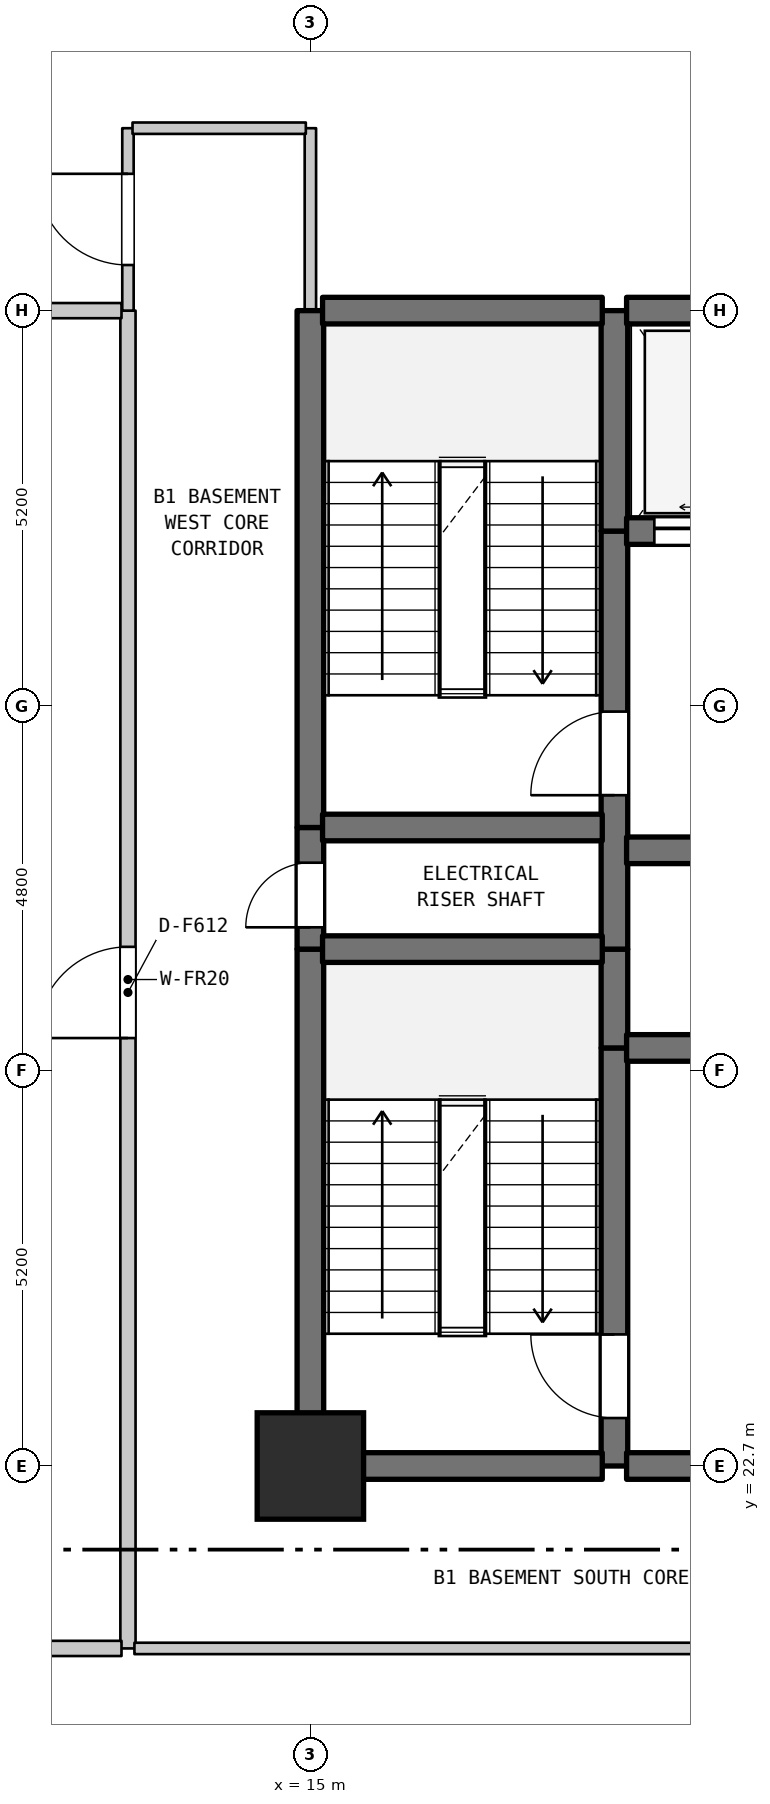
"""IFC4 building model, lengths in metres.
Left out: names, types, materials, properties, quantities, classifications, styles, units other than length and angle.
Written with IfcOpenShell. Run it as: python <this file> out.ifc"""

import sys

from ifc_helpers import new_model, si_unit, direction, frame, frame_2d, origin, origin_2d, place, context, subcontext, project, spatial, rectangle, extrude, element, fill, save


model = new_model("IFC4")
c1 = context("Model", 3, precision=1e-05, world=origin(), true_north=direction((0.0, 1.0)))
c2 = subcontext(c1, "Body", "Model", "MODEL_VIEW")
j1 = project(units=[si_unit("LENGTHUNIT", "METRE"), si_unit("PLANEANGLEUNIT", "RADIAN")], contexts=[c1])
p1 = place(None, origin())
s1 = spatial("IfcSite", under=j1, at=p1, CompositionType="ELEMENT")
p2 = place(p1, origin())
s2 = spatial("IfcBuilding", under=s1, at=p2, CompositionType="ELEMENT")
p3 = place(p2, frame((0.0, 0.0, -4.5)))
s3 = spatial("IfcBuildingStorey", under=s2, at=p3, CompositionType="ELEMENT", Elevation=-4.5)
p4 = place(p3, frame((15.0, 22.7, 0.0), z_axis=(0.0, 0.0, 1.0), x_axis=(1.0, 0.0, 0.0)))
e1 = element("IfcColumn", 1, at=p4, inside=s3, PredefinedType="COLUMN", context=c2, shape_type="SweptSolid", body=[
    extrude(rectangle(XDim=1.4, YDim=1.4, at=origin_2d()), origin(), (0.0, 0.0, 1.0), 4.5),
])
p5 = place(p3, frame((12.6, 20.3, 0.0), z_axis=(0.0, 0.0, 1.0), x_axis=(0.0, 1.0, 0.0)))
e2 = element("IfcWall", 2, at=p5, inside=s3, PredefinedType="STANDARD", context=c2, shape_type="SweptSolid", body=[
    extrude(rectangle(XDim=17.6, YDim=0.2, at=frame_2d((8.8, 0.0))), origin(), (0.0, 0.0, 1.0), 4.1),
])
p6 = place(p5, frame((8.03, 0.0, 0.0)))
e3 = element("IfcOpeningElement", 3, at=p6, cuts=e2, PredefinedType="OPENING", context=c2, shape_type="SweptSolid", body=[
    extrude(rectangle(XDim=1.2, YDim=2.2, at=frame_2d((0.6, 1.1))), frame((0.0, 0.11, 0.0), z_axis=(0.0, -1.0, 0.0), x_axis=(1.0, 0.0, 0.0)), (0.0, 0.0, 1.0), 0.22),
])
p7 = place(p3, frame((12.6, 37.9, 0.0), z_axis=(0.0, 0.0, 1.0), x_axis=(0.0, 1.0, 0.0)))
e4 = element("IfcWall", 4, at=p7, inside=s3, PredefinedType="STANDARD", context=c2, shape_type="SweptSolid", body=[
    extrude(rectangle(XDim=2.4, YDim=0.15, at=frame_2d((1.2, 0.0))), origin(), (0.0, 0.0, 1.0), 4.1),
])
p8 = place(p7, frame((0.6, 0.0, 0.0)))
e5 = element("IfcOpeningElement", 5, at=p8, cuts=e4, PredefinedType="OPENING", context=c2, shape_type="SweptSolid", body=[
    extrude(rectangle(XDim=1.2, YDim=2.2, at=frame_2d((0.6, 1.1))), frame((0.0, 0.085, 0.0), z_axis=(0.0, -1.0, 0.0), x_axis=(1.0, 0.0, 0.0)), (0.0, 0.0, 1.0), 0.17),
])
p9 = place(p3, frame((15.0, 22.7, 0.0), z_axis=(0.0, 0.0, 1.0), x_axis=(0.0, 1.0, 0.0)))
e6 = element("IfcWall", 6, at=p9, inside=s3, PredefinedType="SHEAR", context=c2, shape_type="SweptSolid", body=[
    extrude(rectangle(XDim=6.8, YDim=0.35, at=frame_2d((3.4, 0.0))), origin(), (0.0, 0.0, 1.0), 4.1),
])
p10 = place(p3, frame((15.0, 29.5, 0.0), z_axis=(0.0, 0.0, 1.0), x_axis=(0.0, 1.0, 0.0)))
e7 = element("IfcWall", 7, at=p10, inside=s3, PredefinedType="SHEAR", context=c2, shape_type="SweptSolid", body=[
    extrude(rectangle(XDim=1.6, YDim=0.35, at=frame_2d((0.8, 0.0))), origin(), (0.0, 0.0, 1.0), 4.1),
])
p11 = place(p10, frame((0.287, 0.0, 0.0)))
e8 = element("IfcOpeningElement", 8, at=p11, cuts=e7, PredefinedType="OPENING", context=c2, shape_type="SweptSolid", body=[
    extrude(rectangle(XDim=0.85, YDim=2.1, at=frame_2d((0.425, 1.05))), frame((0.0, 0.185, 0.0), z_axis=(0.0, -1.0, 0.0), x_axis=(1.0, 0.0, 0.0)), (0.0, 0.0, 1.0), 0.37),
])
p12 = place(p3, frame((15.0, 31.1, 0.0), z_axis=(0.0, 0.0, 1.0), x_axis=(0.0, 1.0, 0.0)))
e9 = element("IfcWall", 9, at=p12, inside=s3, PredefinedType="SHEAR", context=c2, shape_type="SweptSolid", body=[
    extrude(rectangle(XDim=6.8, YDim=0.35, at=frame_2d((3.4, 0.0))), origin(), (0.0, 0.0, 1.0), 4.1),
])
p13 = place(p3, frame((15.0, 37.9, 0.0), z_axis=(0.0, 0.0, 1.0), x_axis=(0.0, 1.0, 0.0)))
e10 = element("IfcWall", 10, at=p13, inside=s3, PredefinedType="STANDARD", context=c2, shape_type="SweptSolid", body=[
    extrude(rectangle(XDim=2.4, YDim=0.15, at=frame_2d((1.2, 0.0))), origin(), (0.0, 0.0, 1.0), 4.1),
])
p14 = place(p3, frame((19.0, 22.7, 0.0), z_axis=(0.0, 0.0, 1.0), x_axis=(0.0, 1.0, 0.0)))
e11 = element("IfcWall", 11, at=p14, inside=s3, PredefinedType="SHEAR", context=c2, shape_type="SweptSolid", body=[
    extrude(rectangle(XDim=5.5, YDim=0.35, at=frame_2d((2.75, 0.0))), origin(), (0.0, 0.0, 1.0), 4.1),
])
p15 = place(p14, frame((0.631, 0.0, 0.0)))
e12 = element("IfcOpeningElement", 12, at=p15, cuts=e11, PredefinedType="OPENING", context=c2, shape_type="SweptSolid", body=[
    extrude(rectangle(XDim=1.1, YDim=2.15, at=frame_2d((0.55, 1.075))), frame((0.0, 0.185, 0.0), z_axis=(0.0, -1.0, 0.0), x_axis=(1.0, 0.0, 0.0)), (0.0, 0.0, 1.0), 0.37),
])
p16 = place(p3, frame((19.0, 28.2, 0.0), z_axis=(0.0, 0.0, 1.0), x_axis=(0.0, 1.0, 0.0)))
e13 = element("IfcWall", 13, at=p16, inside=s3, PredefinedType="SHEAR", context=c2, shape_type="SweptSolid", body=[
    extrude(rectangle(XDim=1.3, YDim=0.35, at=frame_2d((0.65, 0.0))), origin(), (0.0, 0.0, 1.0), 4.1),
])
p17 = place(p3, frame((19.0, 29.5, 0.0), z_axis=(0.0, 0.0, 1.0), x_axis=(0.0, 1.0, 0.0)))
e14 = element("IfcWall", 14, at=p17, inside=s3, PredefinedType="SHEAR", context=c2, shape_type="SweptSolid", body=[
    extrude(rectangle(XDim=5.5, YDim=0.35, at=frame_2d((2.75, 0.0))), origin(), (0.0, 0.0, 1.0), 4.1),
])
p18 = place(p17, frame((2.025, 0.0, 0.0)))
e15 = element("IfcOpeningElement", 15, at=p18, cuts=e14, PredefinedType="OPENING", context=c2, shape_type="SweptSolid", body=[
    extrude(rectangle(XDim=1.1, YDim=2.15, at=frame_2d((0.55, 1.075))), frame((0.0, 0.185, 0.0), z_axis=(0.0, -1.0, 0.0), x_axis=(1.0, 0.0, 0.0)), (0.0, 0.0, 1.0), 0.37),
])
p19 = place(p3, frame((19.0, 35.0, 0.0), z_axis=(0.0, 0.0, 1.0), x_axis=(0.0, 1.0, 0.0)))
e16 = element("IfcWall", 16, at=p19, inside=s3, PredefinedType="SHEAR", context=c2, shape_type="SweptSolid", body=[
    extrude(rectangle(XDim=2.9, YDim=0.35, at=frame_2d((1.45, 0.0))), origin(), (0.0, 0.0, 1.0), 4.1),
])
p20 = place(p3, frame((2.01, 20.3, 0.0), z_axis=(0.0, 0.0, 1.0), x_axis=(1.0, 0.0, 0.0)))
e17 = element("IfcWall", 17, at=p20, inside=s3, PredefinedType="STANDARD", context=c2, shape_type="SweptSolid", body=[
    extrude(rectangle(XDim=10.505, YDim=0.2, at=frame_2d((5.252, 0.0))), origin(), (0.0, 0.0, 1.0), 4.1),
])
p21 = place(p3, frame((12.685, 20.3, 0.0), z_axis=(0.0, 0.0, 1.0), x_axis=(1.0, 0.0, 0.0)))
e18 = element("IfcWall", 18, at=p21, inside=s3, PredefinedType="STANDARD", context=c2, shape_type="SweptSolid", body=[
    extrude(rectangle(XDim=20.255, YDim=0.15, at=frame_2d((10.127, 0.0))), origin(), (0.0, 0.0, 1.0), 4.1),
])
p22 = place(p21, frame((8.644, 0.0, 0.0)))
e19 = element("IfcOpeningElement", 19, at=p22, cuts=e18, PredefinedType="OPENING", context=c2, shape_type="SweptSolid", body=[
    extrude(rectangle(XDim=1.2, YDim=2.2, at=frame_2d((0.6, 1.1))), frame((0.0, 0.085, 0.0), z_axis=(0.0, -1.0, 0.0), x_axis=(1.0, 0.0, 0.0)), (0.0, 0.0, 1.0), 0.17),
])
p23 = place(p3, frame((15.16, 22.7, 0.0), z_axis=(0.0, 0.0, 1.0), x_axis=(1.0, 0.0, 0.0)))
e20 = element("IfcWall", 20, at=p23, inside=s3, PredefinedType="SHEAR", context=c2, shape_type="SweptSolid", body=[
    extrude(rectangle(XDim=3.68, YDim=0.35, at=frame_2d((1.84, 0.0))), origin(), (0.0, 0.0, 1.0), 4.1),
])
p24 = place(p3, frame((19.16, 22.7, 0.0), z_axis=(0.0, 0.0, 1.0), x_axis=(1.0, 0.0, 0.0)))
e21 = element("IfcWall", 21, at=p24, inside=s3, PredefinedType="SHEAR", context=c2, shape_type="SweptSolid", body=[
    extrude(rectangle(XDim=4.48, YDim=0.35, at=frame_2d((2.24, 0.0))), origin(), (0.0, 0.0, 1.0), 4.1),
])
p25 = place(p24, frame((1.64, 0.0, 0.0)))
e22 = element("IfcOpeningElement", 22, at=p25, cuts=e21, PredefinedType="OPENING", context=c2, shape_type="SweptSolid", body=[
    extrude(rectangle(XDim=1.2, YDim=2.2, at=frame_2d((0.6, 1.1))), frame((0.0, 0.185, 0.0), z_axis=(0.0, -1.0, 0.0), x_axis=(1.0, 0.0, 0.0)), (0.0, 0.0, 1.0), 0.37),
])
p26 = place(p3, frame((19.16, 28.2, 0.0), z_axis=(0.0, 0.0, 1.0), x_axis=(1.0, 0.0, 0.0)))
e23 = element("IfcWall", 23, at=p26, inside=s3, PredefinedType="SHEAR", context=c2, shape_type="SweptSolid", body=[
    extrude(rectangle(XDim=4.48, YDim=0.35, at=frame_2d((2.24, 0.0))), origin(), (0.0, 0.0, 1.0), 4.1),
])
p27 = place(p26, frame((1.79, 0.0, 0.0)))
e24 = element("IfcOpeningElement", 24, at=p27, cuts=e23, PredefinedType="OPENING", context=c2, shape_type="SweptSolid", body=[
    extrude(rectangle(XDim=0.9, YDim=2.15, at=frame_2d((0.45, 1.075))), frame((0.0, 0.185, 0.0), z_axis=(0.0, -1.0, 0.0), x_axis=(1.0, 0.0, 0.0)), (0.0, 0.0, 1.0), 0.37),
])
p28 = place(p3, frame((15.16, 29.5, 0.0), z_axis=(0.0, 0.0, 1.0), x_axis=(1.0, 0.0, 0.0)))
e25 = element("IfcWall", 25, at=p28, inside=s3, PredefinedType="SHEAR", context=c2, shape_type="SweptSolid", body=[
    extrude(rectangle(XDim=3.68, YDim=0.35, at=frame_2d((1.84, 0.0))), origin(), (0.0, 0.0, 1.0), 4.1),
])
p29 = place(p3, frame((19.16, 30.8, 0.0), z_axis=(0.0, 0.0, 1.0), x_axis=(1.0, 0.0, 0.0)))
e26 = element("IfcWall", 26, at=p29, inside=s3, PredefinedType="SHEAR", context=c2, shape_type="SweptSolid", body=[
    extrude(rectangle(XDim=4.48, YDim=0.35, at=frame_2d((2.24, 0.0))), origin(), (0.0, 0.0, 1.0), 4.1),
])
p30 = place(p3, frame((15.16, 31.1, 0.0), z_axis=(0.0, 0.0, 1.0), x_axis=(1.0, 0.0, 0.0)))
e27 = element("IfcWall", 27, at=p30, inside=s3, PredefinedType="SHEAR", context=c2, shape_type="SweptSolid", body=[
    extrude(rectangle(XDim=3.68, YDim=0.35, at=frame_2d((1.84, 0.0))), origin(), (0.0, 0.0, 1.0), 4.1),
])
p31 = place(p3, frame((19.16, 35.0, 0.0), z_axis=(0.0, 0.0, 1.0), x_axis=(1.0, 0.0, 0.0)))
e28 = element("IfcWall", 28, at=p31, inside=s3, PredefinedType="SHEAR", context=c2, shape_type="SweptSolid", body=[
    extrude(rectangle(XDim=4.48, YDim=0.35, at=frame_2d((2.24, 0.0))), origin(), (0.0, 0.0, 1.0), 4.1),
])
p32 = place(p31, frame((0.365, 0.0, 0.0)))
e29 = element("IfcOpeningElement", 29, at=p32, cuts=e28, PredefinedType="OPENING", context=c2, shape_type="SweptSolid", body=[
    extrude(rectangle(XDim=1.35, YDim=2.2, at=frame_2d((0.675, 1.1))), frame((0.0, 0.185, 0.0), z_axis=(0.0, -1.0, 0.0), x_axis=(1.0, 0.0, 0.0)), (0.0, 0.0, 1.0), 0.37),
])
p33 = place(p31, frame((2.765, 0.0, 0.0)))
e30 = element("IfcOpeningElement", 30, at=p33, cuts=e28, PredefinedType="OPENING", context=c2, shape_type="SweptSolid", body=[
    extrude(rectangle(XDim=1.35, YDim=2.2, at=frame_2d((0.675, 1.1))), frame((0.0, 0.185, 0.0), z_axis=(0.0, -1.0, 0.0), x_axis=(1.0, 0.0, 0.0)), (0.0, 0.0, 1.0), 0.37),
])
p34 = place(p3, frame((15.16, 37.9, 0.0), z_axis=(0.0, 0.0, 1.0), x_axis=(1.0, 0.0, 0.0)))
e31 = element("IfcWall", 31, at=p34, inside=s3, PredefinedType="SHEAR", context=c2, shape_type="SweptSolid", body=[
    extrude(rectangle(XDim=3.68, YDim=0.35, at=frame_2d((1.84, 0.0))), origin(), (0.0, 0.0, 1.0), 4.1),
])
p35 = place(p3, frame((19.16, 37.9, 0.0), z_axis=(0.0, 0.0, 1.0), x_axis=(1.0, 0.0, 0.0)))
e32 = element("IfcWall", 32, at=p35, inside=s3, PredefinedType="SHEAR", context=c2, shape_type="SweptSolid", body=[
    extrude(rectangle(XDim=4.48, YDim=0.35, at=frame_2d((2.24, 0.0))), origin(), (0.0, 0.0, 1.0), 4.1),
])
p36 = place(p3, frame((12.66, 40.3, 0.0), z_axis=(0.0, 0.0, 1.0), x_axis=(1.0, 0.0, 0.0)))
e33 = element("IfcWall", 33, at=p36, inside=s3, PredefinedType="STANDARD", context=c2, shape_type="SweptSolid", body=[
    extrude(rectangle(XDim=2.28, YDim=0.15, at=frame_2d((1.14, 0.0))), origin(), (0.0, 0.0, 1.0), 4.1),
])
p37 = place(p3, frame((9.0, 37.9, 0.0), z_axis=(0.0, 0.0, 1.0), x_axis=(1.0, 0.0, 0.0)))
e34 = element("IfcWall", 34, at=p37, inside=s3, PredefinedType="STANDARD", context=c2, shape_type="SweptSolid", body=[
    extrude(rectangle(XDim=3.515, YDim=0.2, at=frame_2d((1.757, 0.0))), origin(), (0.0, 0.0, 1.0), 3.2),
])
p38 = place(p6, origin())
e35 = element("IfcDoor", 35, at=p38, inside=s3, OperationType="SINGLE_SWING_LEFT", PredefinedType="DOOR", context=c2, shape_type="SweptSolid", body=[
    extrude(rectangle(XDim=1.2, YDim=2.2, at=frame_2d((0.6, 1.1))), frame((0.0, 0.025, 0.0), z_axis=(0.0, -1.0, 0.0), x_axis=(1.0, 0.0, 0.0)), (0.0, 0.0, 1.0), 0.05),
])
fill(e3, e35)
p39 = place(p8, origin())
e36 = element("IfcDoor", 36, at=p39, inside=s3, OperationType="SINGLE_SWING_RIGHT", PredefinedType="DOOR", context=c2, shape_type="SweptSolid", body=[
    extrude(rectangle(XDim=1.2, YDim=2.2, at=frame_2d((0.6, 1.1))), frame((0.0, 0.025, 0.0), z_axis=(0.0, -1.0, 0.0), x_axis=(1.0, 0.0, 0.0)), (0.0, 0.0, 1.0), 0.05),
])
fill(e5, e36)
p40 = place(p11, origin())
e37 = element("IfcDoor", 37, at=p40, inside=s3, OperationType="SINGLE_SWING_LEFT", PredefinedType="DOOR", context=c2, shape_type="SweptSolid", body=[
    extrude(rectangle(XDim=0.85, YDim=2.1, at=frame_2d((0.425, 1.05))), frame((0.0, 0.025, 0.0), z_axis=(0.0, -1.0, 0.0), x_axis=(1.0, 0.0, 0.0)), (0.0, 0.0, 1.0), 0.05),
])
fill(e8, e37)
p41 = place(p15, origin())
e38 = element("IfcDoor", 38, at=p41, inside=s3, OperationType="SINGLE_SWING_RIGHT", PredefinedType="DOOR", context=c2, shape_type="SweptSolid", body=[
    extrude(rectangle(XDim=1.1, YDim=2.15, at=frame_2d((0.55, 1.075))), frame((0.0, 0.025, 0.0), z_axis=(0.0, -1.0, 0.0), x_axis=(1.0, 0.0, 0.0)), (0.0, 0.0, 1.0), 0.05),
])
fill(e12, e38)
p42 = place(p18, origin())
e39 = element("IfcDoor", 39, at=p42, inside=s3, OperationType="SINGLE_SWING_LEFT", PredefinedType="DOOR", context=c2, shape_type="SweptSolid", body=[
    extrude(rectangle(XDim=1.1, YDim=2.15, at=frame_2d((0.55, 1.075))), frame((0.0, 0.025, 0.0), z_axis=(0.0, -1.0, 0.0), x_axis=(1.0, 0.0, 0.0)), (0.0, 0.0, 1.0), 0.05),
])
fill(e15, e39)
p43 = place(p32, origin())
e40 = element("IfcDoor", 40, at=p43, inside=s3, OperationType="DOUBLE_DOOR_SLIDING", PredefinedType="DOOR", context=c2, shape_type="SweptSolid", body=[
    extrude(rectangle(XDim=1.35, YDim=2.2, at=frame_2d((0.675, 1.1))), frame((0.0, 0.025, 0.0), z_axis=(0.0, -1.0, 0.0), x_axis=(1.0, 0.0, 0.0)), (0.0, 0.0, 1.0), 0.05),
])
fill(e29, e40)
save(model, sys.argv[1])
